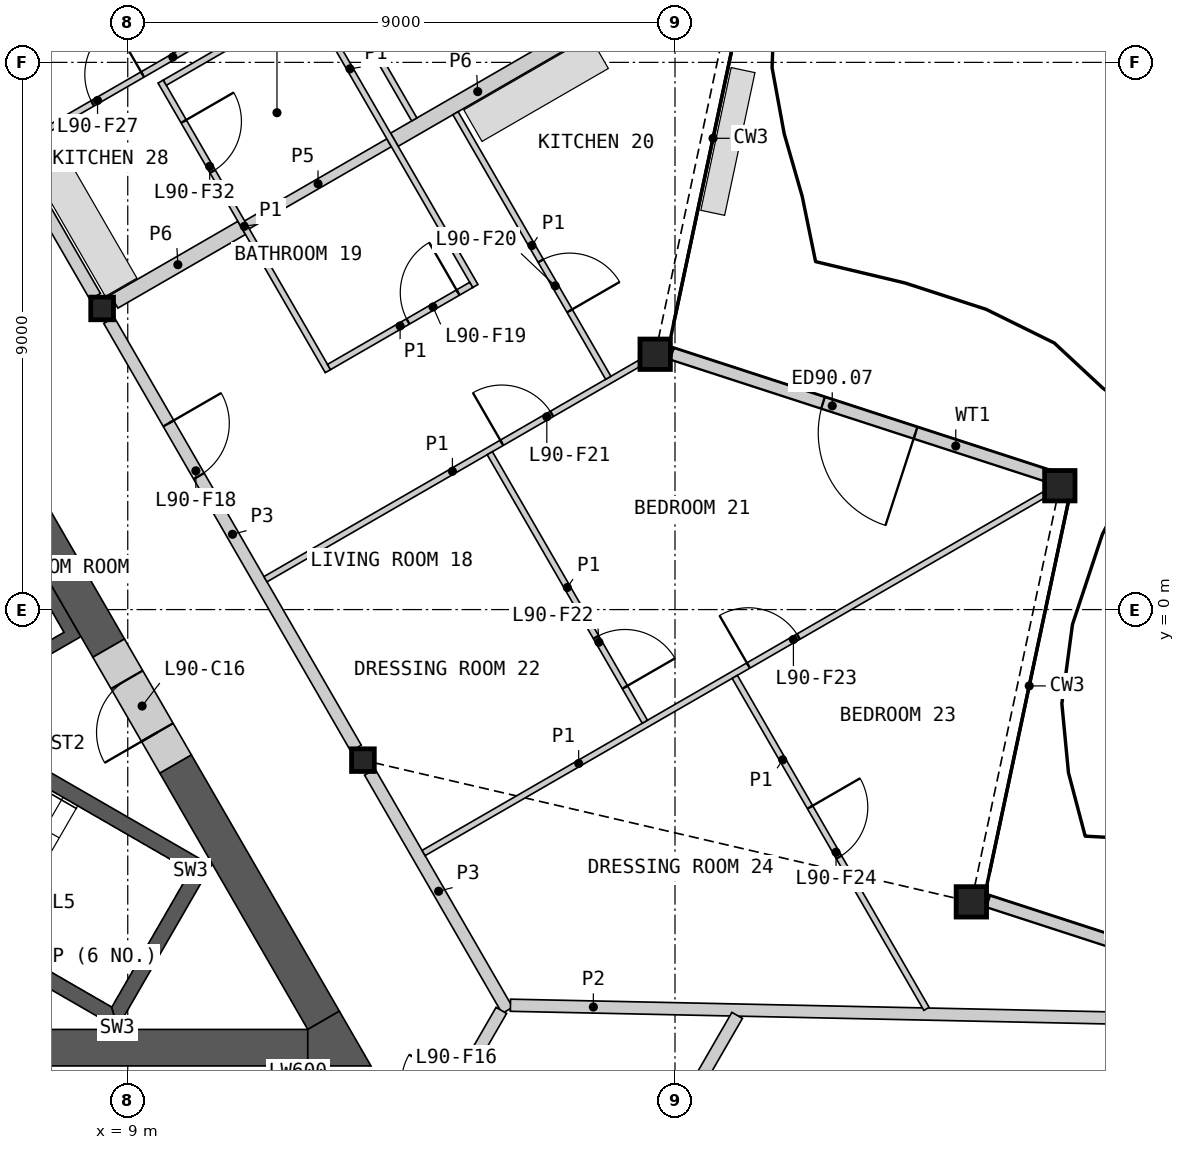
"""IFC4 building model, lengths in metres.
Left out: names, types, materials, properties, quantities, classifications, styles, units other than length and angle.
Written with IfcOpenShell. Run it as: python <this file> out.ifc"""

import sys

from ifc_helpers import new_model, si_unit, direction, frame, frame_2d, origin, origin_2d, place, context, subcontext, project, spatial, polyline, rectangle, hollow_rectangle, i_section, outline, extrude, element, fill, save


model = new_model("IFC4")
c1 = context("Model", 3, precision=1e-05, world=origin(), true_north=direction((0.0, 1.0)))
c2 = subcontext(c1, "Body", "Model", "MODEL_VIEW")
j1 = project(units=[si_unit("LENGTHUNIT", "METRE"), si_unit("PLANEANGLEUNIT", "RADIAN")], contexts=[c1])
p1 = place(None, origin())
s1 = spatial("IfcSite", under=j1, at=p1, CompositionType="ELEMENT")
p2 = place(p1, origin())
s2 = spatial("IfcBuilding", under=s1, at=p2, CompositionType="ELEMENT")
p3 = place(p2, frame((0.0, 0.0, 395.0)))
s3 = spatial("IfcBuildingStorey", under=s2, at=p3, CompositionType="ELEMENT", Elevation=395.0)
for number, where, z_axis, x_axis in (
    (1, (22.874, -4.807, 0.0), (0.0, 0.0, 1.0), (1.0, 0.0, 0.0)),
    (2, (24.329, 2.037, 0.0), (0.0, 0.0, 1.0), (1.0, 0.0, 0.0)),
    (3, (17.674, 4.199, 0.0), (0.0, 0.0, 1.0), (1.0, 0.0, 0.0)),
):
    element("IfcColumn", number, at=place(p3, frame(where, z_axis=z_axis, x_axis=x_axis)), inside=s3, PredefinedType="COLUMN", context=c2, shape_type="SweptSolid", body=[
        extrude(hollow_rectangle(XDim=0.5, YDim=0.5, WallThickness=0.03, at=origin_2d()), origin(), (0.0, 0.0, 1.0), 3.4),
    ])
for number, where, z_axis, x_axis in (
    (4, (12.868, -2.476, 0.0), (0.0, 0.0, 1.0), (1.0, 0.0, 0.0)),
    (5, (8.578, 4.953, 0.0), (0.0, 0.0, 1.0), (1.0, 0.0, 0.0)),
):
    element("IfcColumn", number, at=place(p3, frame(where, z_axis=z_axis, x_axis=x_axis)), inside=s3, PredefinedType="COLUMN", context=c2, shape_type="SweptSolid", body=[
        extrude(i_section(OverallWidth=0.374, OverallDepth=0.372, WebThickness=0.016, FlangeThickness=0.026, at=origin_2d()), origin(), (0.0, 0.0, 1.0), 3.4),
    ])
p4 = place(p3, frame((29.374, -6.822, 0.0), z_axis=(0.0, 0.0, 1.0), x_axis=(-0.951061473407, 0.309001737536, 0.0)))
e6 = element("IfcWall", 6, at=p4, inside=s3, PredefinedType="SOLIDWALL", context=c2, shape_type="SweptSolid", body=[
    extrude(rectangle(XDim=6.546, YDim=0.2, at=frame_2d((3.273, 0.0))), origin(), (0.0, 0.0, 1.0), 2.634),
])
p5 = place(p4, frame((2.333, 0.0, 0.0)))
e7 = element("IfcOpeningElement", 7, at=p5, cuts=e6, PredefinedType="OPENING", context=c2, shape_type="SweptSolid", body=[
    extrude(rectangle(XDim=1.6, YDim=2.25, at=frame_2d((0.8, 1.125))), frame((0.0, 0.11, 0.0), z_axis=(0.0, -1.0, 0.0), x_axis=(1.0, 0.0, 0.0)), (0.0, 0.0, 1.0), 0.22),
])
p6 = place(p3, frame((24.174, 2.185, 0.0), z_axis=(0.0, 0.0, 1.0), x_axis=(-0.951061473407, 0.309001737536, 0.0)))
e8 = element("IfcWall", 8, at=p6, inside=s3, PredefinedType="SOLIDWALL", context=c2, shape_type="SweptSolid", body=[
    extrude(rectangle(XDim=6.546, YDim=0.2, at=frame_2d((3.273, 0.0))), origin(), (0.0, 0.0, 1.0), 2.634),
])
p7 = place(p6, frame((2.333, 0.0, 0.0)))
e9 = element("IfcOpeningElement", 9, at=p7, cuts=e8, PredefinedType="OPENING", context=c2, shape_type="SweptSolid", body=[
    extrude(rectangle(XDim=1.6, YDim=2.25, at=frame_2d((0.8, 1.125))), frame((0.0, 0.11, 0.0), z_axis=(0.0, -1.0, 0.0), x_axis=(1.0, 0.0, 0.0)), (0.0, 0.0, 1.0), 0.22),
])
p8 = place(p3, origin())
e10 = element("IfcWall", 10, at=p8, inside=s3, PredefinedType="SHEAR", context=c2, shape_type="SweptSolid", body=[
    extrude(outline(polyline([(1.561, 6.097), (3.731, 7.35), (8.231, -0.444), (6.061, -1.697), (5.96, -1.524), (7.952, -0.374), (6.952, 1.358), (4.96, 0.208), (4.861, 0.381), (6.852, 1.531), (5.852, 3.263), (3.861, 2.113), (3.76, 2.287), (5.752, 3.437), (4.752, 5.169), (2.76, 4.019), (2.66, 4.192), (4.652, 5.342), (3.652, 7.074), (1.66, 5.924), (1.561, 6.097)])), origin(), (0.0, 0.0, 1.0), 3.1),
])
p9 = place(p3, origin())
e11 = element("IfcWall", 11, at=p9, inside=s3, PredefinedType="SHEAR", context=c2, shape_type="SweptSolid", body=[
    extrude(outline(polyline([(3.763, -3.956), (8.83, -6.881), (8.738, -6.539), (3.888, -3.739), (3.763, -3.956)])), origin(), (0.0, 0.0, 1.0), 3.1),
])
p10 = place(p3, origin())
e12 = element("IfcWall", 12, at=p10, inside=s3, PredefinedType="SHEAR", context=c2, shape_type="SweptSolid", body=[
    extrude(outline(polyline([(8.83, -6.881), (10.374, -4.206), (10.032, -4.298), (8.738, -6.539), (8.83, -6.881)])), origin(), (0.0, 0.0, 1.0), 3.1),
])
p11 = place(p3, origin())
e13 = element("IfcWall", 13, at=p11, inside=s3, PredefinedType="SHEAR", context=c2, shape_type="SweptSolid", body=[
    extrude(outline(polyline([(10.032, -4.298), (10.374, -4.206), (5.307, -1.281), (5.182, -1.498), (10.032, -4.298)])), origin(), (0.0, 0.0, 1.0), 3.1),
])
p12 = place(p3, frame((-11.961, -7.206, 0.0), z_axis=(0.0, 0.0, 1.0), x_axis=(1.0, 0.0, 0.0)))
e14 = element("IfcWall", 14, at=p12, inside=s3, PredefinedType="SHEAR", context=c2, shape_type="SweptSolid", body=[
    extrude(rectangle(XDim=23.921, YDim=0.6, at=frame_2d((11.961, 0.0))), origin(), (0.0, 0.0, 1.0), 3.1),
])
p13 = place(p3, frame((8.686, -0.634, 0.0), z_axis=(0.0, 0.0, 1.0), x_axis=(-0.50001836461, 0.866014800712, 0.0)))
e15 = element("IfcWall", 15, at=p13, inside=s3, PredefinedType="SHEAR", context=c2, shape_type="SweptSolid", body=[
    extrude(rectangle(XDim=10.451, YDim=0.6, at=frame_2d((5.225, 0.0))), origin(), (0.0, 0.0, 1.0), 3.1),
])
p14 = place(p3, frame((12.221, -6.756, 0.0), z_axis=(0.0, 0.0, 1.0), x_axis=(-0.50000604952, 0.866021911064, 0.0)))
e16 = element("IfcWall", 16, at=p14, inside=s3, PredefinedType="SHEAR", context=c2, shape_type="SweptSolid", body=[
    extrude(rectangle(XDim=4.869, YDim=0.6, at=frame_2d((2.434, 0.0))), origin(), (0.0, 0.0, 1.0), 3.1),
])
p15 = place(p3, origin())
e17 = element("IfcWall", 17, at=p15, inside=s3, PredefinedType="SHEAR", context=c2, shape_type="SweptSolid", body=[
    extrude(outline(polyline([(11.961, -7.506), (11.961, -6.906), (12.48, -6.606), (13.0, -7.506), (11.961, -7.506)])), origin(), (0.0, 0.0, 1.0), 3.1),
])
p16 = place(p3, frame((9.786, -2.539, 0.0), z_axis=(0.0, 0.0, 1.0), x_axis=(-0.499981787252, 0.866035918664, 0.0)))
e18 = element("IfcWall", 18, at=p16, inside=s3, PredefinedType="SHEAR", context=c2, shape_type="SweptSolid", body=[
    extrude(rectangle(XDim=2.2, YDim=0.6, at=frame_2d((1.1, 0.0))), origin(), (0.0, 0.0, 1.0), 3.1),
])
p17 = place(p16, frame((0.6, 0.0, 0.0)))
e19 = element("IfcOpeningElement", 19, at=p17, cuts=e18, PredefinedType="OPENING", context=c2, shape_type="SweptSolid", body=[
    extrude(rectangle(XDim=1.0, YDim=2.1, at=frame_2d((0.5, 1.05))), frame((0.0, 0.31, 0.0), z_axis=(0.0, -1.0, 0.0), x_axis=(1.0, 0.0, 0.0)), (0.0, 0.0, 1.0), 0.62),
])
p18 = place(p3, frame((4.403, 12.185, 0.0), z_axis=(0.0, 0.0, 1.0), x_axis=(0.499992155518, -0.866029932751, 0.0)))
e20 = element("IfcWall", 20, at=p18, inside=s3, PredefinedType="PARTITIONING", context=c2, shape_type="SweptSolid", body=[
    extrude(rectangle(XDim=8.123, YDim=0.2, at=frame_2d((4.062, 0.0))), origin(), (0.0, 0.0, 1.0), 3.1),
])
p19 = place(p18, frame((3.762, 0.0, 0.0)))
e21 = element("IfcOpeningElement", 21, at=p19, cuts=e20, PredefinedType="OPENING", context=c2, shape_type="SweptSolid", body=[
    extrude(rectangle(XDim=1.0, YDim=2.1, at=frame_2d((0.5, 1.05))), frame((0.0, 0.11, 0.0), z_axis=(0.0, -1.0, 0.0), x_axis=(1.0, 0.0, 0.0)), (0.0, 0.0, 1.0), 0.22),
])
p20 = place(p3, frame((8.692, 4.756, 0.0), z_axis=(0.0, 0.0, 1.0), x_axis=(0.500001682468, -0.866024432409, 0.0)))
e22 = element("IfcWall", 22, at=p20, inside=s3, PredefinedType="PARTITIONING", context=c2, shape_type="SweptSolid", body=[
    extrude(rectangle(XDim=8.124, YDim=0.2, at=frame_2d((4.062, 0.0))), origin(), (0.0, 0.0, 1.0), 3.1),
])
p21 = place(p20, frame((1.956, 0.0, 0.0)))
e23 = element("IfcOpeningElement", 23, at=p21, cuts=e22, PredefinedType="OPENING", context=c2, shape_type="SweptSolid", body=[
    extrude(rectangle(XDim=1.0, YDim=2.1, at=frame_2d((0.5, 1.05))), frame((0.0, 0.11, 0.0), z_axis=(0.0, -1.0, 0.0), x_axis=(1.0, 0.0, 0.0)), (0.0, 0.0, 1.0), 0.22),
])
p22 = place(p3, frame((13.385, 7.728, 0.0), z_axis=(0.0, 0.0, 1.0), x_axis=(0.866023139795, 0.500003921324, 0.0)))
e24 = element("IfcWall", 24, at=p22, inside=s3, PredefinedType="PARTITIONING", context=c2, shape_type="SweptSolid", body=[
    extrude(rectangle(XDim=6.332, YDim=0.25, at=frame_2d((3.166, 0.0))), origin(), (0.0, 0.0, 1.0), 2.33),
])
p23 = place(p3, frame((12.981, -2.673, 0.0), z_axis=(0.0, 0.0, 1.0), x_axis=(0.499974648164, -0.866040040179, 0.0)))
e25 = element("IfcWall", 25, at=p23, inside=s3, PredefinedType="PARTITIONING", context=c2, shape_type="SweptSolid", body=[
    extrude(rectangle(XDim=4.525, YDim=0.2, at=frame_2d((2.263, 0.0))), origin(), (0.0, 0.0, 1.0), 3.1),
])
p24 = place(p3, frame((13.281, -9.819, 0.0), z_axis=(0.0, 0.0, 1.0), x_axis=(0.499958791762, 0.866049194065, 0.0)))
e26 = element("IfcWall", 26, at=p24, inside=s3, PredefinedType="PARTITIONING", context=c2, shape_type="SweptSolid", body=[
    extrude(rectangle(XDim=3.726, YDim=0.2, at=frame_2d((1.863, 0.0))), origin(), (0.0, 0.0, 1.0), 3.1),
])
p25 = place(p24, frame((1.388, 0.0, 0.0)))
e27 = element("IfcOpeningElement", 27, at=p25, cuts=e26, PredefinedType="OPENING", context=c2, shape_type="SweptSolid", body=[
    extrude(rectangle(XDim=0.95, YDim=2.1, at=frame_2d((0.475, 1.05))), frame((0.0, 0.11, 0.0), z_axis=(0.0, -1.0, 0.0), x_axis=(1.0, 0.0, 0.0)), (0.0, 0.0, 1.0), 0.22),
])
p26 = place(p3, frame((8.775, 5.066, 0.0), z_axis=(0.0, 0.0, 1.0), x_axis=(0.865989219354, 0.500062668036, 0.0)))
e28 = element("IfcWall", 28, at=p26, inside=s3, PredefinedType="PARTITIONING", context=c2, shape_type="SweptSolid", body=[
    extrude(rectangle(XDim=2.423, YDim=0.25, at=frame_2d((1.211, 0.0))), origin(), (0.0, 0.0, 1.0), 2.33),
])
p27 = place(p3, frame((15.294, -6.508, 0.0), z_axis=(0.0, 0.0, 1.0), x_axis=(0.999775726416, -0.02117774467, 0.0)))
e29 = element("IfcWall", 29, at=p27, inside=s3, PredefinedType="PARTITIONING", context=c2, shape_type="SweptSolid", body=[
    extrude(rectangle(XDim=13.638, YDim=0.2, at=frame_2d((6.819, 0.0))), origin(), (0.0, 0.0, 1.0), 2.33),
])
p28 = place(p3, frame((17.271, -9.708, 0.0), z_axis=(0.0, 0.0, 1.0), x_axis=(0.499983843005, 0.866034731829, 0.0)))
e30 = element("IfcWall", 30, at=p28, inside=s3, PredefinedType="PARTITIONING", context=c2, shape_type="SweptSolid", body=[
    extrude(rectangle(XDim=3.503, YDim=0.2, at=frame_2d((1.752, 0.0))), origin(), (0.0, 0.0, 1.0), 2.33),
])
p29 = place(p3, frame((10.96, 6.328, 0.0), z_axis=(0.0, 0.0, 1.0), x_axis=(0.866059108428, 0.4999416173, 0.0)))
e31 = element("IfcWall", 31, at=p29, inside=s3, PredefinedType="PLUMBINGWALL", context=c2, shape_type="SweptSolid", body=[
    extrude(rectangle(XDim=2.7, YDim=0.15, at=frame_2d((1.35, 0.0))), origin(), (0.0, 0.0, 1.0), 2.33),
])
p30 = place(p3, frame((13.865, -4.004, 0.0), z_axis=(0.0, 0.0, 1.0), x_axis=(0.866023404247, 0.500003463284, 0.0)))
e32 = element("IfcWall", 32, at=p30, inside=s3, PredefinedType="PARTITIONING", context=c2, shape_type="SweptSolid", body=[
    extrude(rectangle(XDim=11.782, YDim=0.1, at=frame_2d((5.891, 0.0))), origin(), (0.0, 0.0, 1.0), 2.33),
])
p31 = place(p30, frame((6.168, 0.0, 0.0)))
e33 = element("IfcOpeningElement", 33, at=p31, cuts=e32, PredefinedType="OPENING", context=c2, shape_type="SweptSolid", body=[
    extrude(rectangle(XDim=0.95, YDim=2.1, at=frame_2d((0.475, 1.05))), frame((0.0, 0.06, 0.0), z_axis=(0.0, -1.0, 0.0), x_axis=(1.0, 0.0, 0.0)), (0.0, 0.0, 1.0), 0.12),
])
p32 = place(p3, frame((11.265, 0.5, 0.0), z_axis=(0.0, 0.0, 1.0), x_axis=(0.866033839264, 0.499985389037, 0.0)))
e34 = element("IfcWall", 34, at=p32, inside=s3, PredefinedType="PARTITIONING", context=c2, shape_type="SweptSolid", body=[
    extrude(rectangle(XDim=7.1, YDim=0.1, at=frame_2d((3.55, 0.0))), origin(), (0.0, 0.0, 1.0), 2.33),
])
p33 = place(p32, frame((4.488, 0.0, 0.0)))
e35 = element("IfcOpeningElement", 35, at=p33, cuts=e34, PredefinedType="OPENING", context=c2, shape_type="SweptSolid", body=[
    extrude(rectangle(XDim=0.95, YDim=2.1, at=frame_2d((0.475, 1.05))), frame((0.0, 0.06, 0.0), z_axis=(0.0, -1.0, 0.0), x_axis=(1.0, 0.0, 0.0)), (0.0, 0.0, 1.0), 0.12),
])
p34 = place(p3, frame((18.983, -1.107, 0.0), z_axis=(0.0, 0.0, 1.0), x_axis=(0.500016298831, -0.866015993445, 0.0)))
e36 = element("IfcWall", 36, at=p34, inside=s3, PredefinedType="PARTITIONING", context=c2, shape_type="SweptSolid", body=[
    extrude(rectangle(XDim=6.305, YDim=0.1, at=frame_2d((3.152, 0.0))), origin(), (0.0, 0.0, 1.0), 2.33),
])
p35 = place(p34, frame((2.475, 0.0, 0.0)))
e37 = element("IfcOpeningElement", 37, at=p35, cuts=e36, PredefinedType="OPENING", context=c2, shape_type="SweptSolid", body=[
    extrude(rectangle(XDim=0.95, YDim=2.1, at=frame_2d((0.475, 1.05))), frame((0.0, 0.06, 0.0), z_axis=(0.0, -1.0, 0.0), x_axis=(1.0, 0.0, 0.0)), (0.0, 0.0, 1.0), 0.12),
])
p36 = place(p3, frame((7.165, 7.601, 0.0), z_axis=(0.0, 0.0, 1.0), x_axis=(0.866017493347, 0.500013701029, 0.0)))
e38 = element("IfcWall", 38, at=p36, inside=s3, PredefinedType="PARTITIONING", context=c2, shape_type="SweptSolid", body=[
    extrude(rectangle(XDim=5.95, YDim=0.1, at=frame_2d((2.975, 0.0))), origin(), (0.0, 0.0, 1.0), 2.33),
])
p37 = place(p36, frame((1.45, 0.0, 0.0)))
e39 = element("IfcOpeningElement", 39, at=p37, cuts=e38, PredefinedType="OPENING", context=c2, shape_type="SweptSolid", body=[
    extrude(rectangle(XDim=0.95, YDim=2.1, at=frame_2d((0.475, 1.05))), frame((0.0, 0.06, 0.0), z_axis=(0.0, -1.0, 0.0), x_axis=(1.0, 0.0, 0.0)), (0.0, 0.0, 1.0), 0.12),
])
p38 = place(p3, frame((11.967, 10.084, 0.0), z_axis=(0.0, 0.0, 1.0), x_axis=(0.500015767406, -0.866016300277, 0.0)))
e40 = element("IfcWall", 40, at=p38, inside=s3, PredefinedType="PARTITIONING", context=c2, shape_type="SweptSolid", body=[
    extrude(rectangle(XDim=5.5, YDim=0.1, at=frame_2d((2.75, 0.0))), origin(), (0.0, 0.0, 1.0), 2.33),
])
p39 = place(p3, frame((9.542, 8.684, 0.0), z_axis=(0.0, 0.0, 1.0), x_axis=(0.499996545922, -0.866027397988, 0.0)))
e41 = element("IfcWall", 41, at=p39, inside=s3, PredefinedType="PARTITIONING", context=c2, shape_type="SweptSolid", body=[
    extrude(rectangle(XDim=5.5, YDim=0.1, at=frame_2d((2.75, 0.0))), origin(), (0.0, 0.0, 1.0), 2.33),
])
p40 = place(p39, frame((0.756, 0.0, 0.0)))
e42 = element("IfcOpeningElement", 42, at=p40, cuts=e41, PredefinedType="OPENING", context=c2, shape_type="SweptSolid", body=[
    extrude(rectangle(XDim=0.95, YDim=2.1, at=frame_2d((0.475, 1.05))), frame((0.0, 0.06, 0.0), z_axis=(0.0, -1.0, 0.0), x_axis=(1.0, 0.0, 0.0)), (0.0, 0.0, 1.0), 0.12),
])
p41 = place(p3, frame((14.39, 8.164, 0.0), z_axis=(0.0, 0.0, 1.0), x_axis=(0.499990214365, -0.86603105345, 0.0)))
e43 = element("IfcWall", 43, at=p41, inside=s3, PredefinedType="PARTITIONING", context=c2, shape_type="SweptSolid", body=[
    extrude(rectangle(XDim=5.025, YDim=0.1, at=frame_2d((2.512, 0.0))), origin(), (0.0, 0.0, 1.0), 2.33),
])
p42 = place(p41, frame((2.803, 0.0, 0.0)))
e44 = element("IfcOpeningElement", 44, at=p42, cuts=e43, PredefinedType="OPENING", context=c2, shape_type="SweptSolid", body=[
    extrude(rectangle(XDim=0.95, YDim=2.1, at=frame_2d((0.475, 1.05))), frame((0.0, 0.06, 0.0), z_axis=(0.0, -1.0, 0.0), x_axis=(1.0, 0.0, 0.0)), (0.0, 0.0, 1.0), 0.12),
])
p43 = place(p3, frame((14.954, 2.572, 0.0), z_axis=(0.0, 0.0, 1.0), x_axis=(0.499984882974, -0.866034131428, 0.0)))
e45 = element("IfcWall", 45, at=p43, inside=s3, PredefinedType="PARTITIONING", context=c2, shape_type="SweptSolid", body=[
    extrude(rectangle(XDim=5.1, YDim=0.1, at=frame_2d((2.55, 0.0))), origin(), (0.0, 0.0, 1.0), 2.33),
])
p44 = place(p43, frame((3.494, 0.0, 0.0)))
e46 = element("IfcOpeningElement", 46, at=p44, cuts=e45, PredefinedType="OPENING", context=c2, shape_type="SweptSolid", body=[
    extrude(rectangle(XDim=0.95, YDim=2.1, at=frame_2d((0.475, 1.05))), frame((0.0, 0.06, 0.0), z_axis=(0.0, -1.0, 0.0), x_axis=(1.0, 0.0, 0.0)), (0.0, 0.0, 1.0), 0.12),
])
p45 = place(p3, frame((12.3, 10.508, 0.0), z_axis=(0.0, 0.0, 1.0), x_axis=(0.500024172624, -0.866011447264, 0.0)))
e47 = element("IfcWall", 47, at=p45, inside=s3, PredefinedType="PARTITIONING", context=c2, shape_type="SweptSolid", body=[
    extrude(rectangle(XDim=2.825, YDim=0.1, at=frame_2d((1.413, 0.0))), origin(), (0.0, 0.0, 1.0), 2.33),
])
p46 = place(p3, frame((9.61, 8.666, 0.0), z_axis=(0.0, 0.0, 1.0), x_axis=(0.86599734893, 0.500048589285, 0.0)))
e48 = element("IfcWall", 48, at=p46, inside=s3, PredefinedType="PARTITIONING", context=c2, shape_type="SweptSolid", body=[
    extrude(rectangle(XDim=2.7, YDim=0.1, at=frame_2d((1.35, 0.0))), origin(), (0.0, 0.0, 1.0), 2.33),
])
p47 = place(p3, frame((12.31, 3.99, 0.0), z_axis=(0.0, 0.0, 1.0), x_axis=(0.86599734893, 0.500048589285, 0.0)))
e49 = element("IfcWall", 49, at=p47, inside=s3, PredefinedType="PARTITIONING", context=c2, shape_type="SweptSolid", body=[
    extrude(rectangle(XDim=2.7, YDim=0.1, at=frame_2d((1.35, 0.0))), origin(), (0.0, 0.0, 1.0), 2.33),
])
p48 = place(p47, frame((1.5, 0.0, 0.0)))
e50 = element("IfcOpeningElement", 50, at=p48, cuts=e49, PredefinedType="OPENING", context=c2, shape_type="SweptSolid", body=[
    extrude(rectangle(XDim=0.95, YDim=2.1, at=frame_2d((0.475, 1.05))), frame((0.0, 0.06, 0.0), z_axis=(0.0, -1.0, 0.0), x_axis=(1.0, 0.0, 0.0)), (0.0, 0.0, 1.0), 0.12),
])
p49 = place(p7, origin())
e51 = element("IfcDoor", 51, at=p49, inside=s3, OperationType="DOUBLE_DOOR_SINGLE_SWING", PredefinedType="DOOR", context=c2, shape_type="SweptSolid", body=[
    extrude(rectangle(XDim=1.6, YDim=2.25, at=frame_2d((0.8, 1.125))), frame((0.0, 0.025, 0.0), z_axis=(0.0, -1.0, 0.0), x_axis=(1.0, 0.0, 0.0)), (0.0, 0.0, 1.0), 0.05),
])
fill(e9, e51)
p50 = place(p17, origin())
e52 = element("IfcDoor", 52, at=p50, inside=s3, OperationType="SINGLE_SWING_LEFT", PredefinedType="DOOR", context=c2, shape_type="SweptSolid", body=[
    extrude(rectangle(XDim=1.0, YDim=2.1, at=frame_2d((0.5, 1.05))), frame((0.0, 0.055, 0.0), z_axis=(0.0, -1.0, 0.0), x_axis=(1.0, 0.0, 0.0)), (0.0, 0.0, 1.0), 0.05),
])
fill(e19, e52)
p51 = place(p21, origin())
e53 = element("IfcDoor", 53, at=p51, inside=s3, OperationType="SINGLE_SWING_LEFT", PredefinedType="DOOR", context=c2, shape_type="SweptSolid", body=[
    extrude(rectangle(XDim=1.0, YDim=2.1, at=frame_2d((0.5, 1.05))), frame((0.0, 0.025, 0.0), z_axis=(0.0, -1.0, 0.0), x_axis=(1.0, 0.0, 0.0)), (0.0, 0.0, 1.0), 0.05),
])
fill(e23, e53)
p52 = place(p48, origin())
e54 = element("IfcDoor", 54, at=p52, inside=s3, OperationType="SINGLE_SWING_RIGHT", PredefinedType="DOOR", context=c2, shape_type="SweptSolid", body=[
    extrude(rectangle(XDim=0.95, YDim=2.1, at=frame_2d((0.475, 1.05))), frame((0.0, 0.025, 0.0), z_axis=(0.0, -1.0, 0.0), x_axis=(1.0, 0.0, 0.0)), (0.0, 0.0, 1.0), 0.05),
])
fill(e50, e54)
p53 = place(p42, origin())
e55 = element("IfcDoor", 55, at=p53, inside=s3, OperationType="SINGLE_SWING_RIGHT", PredefinedType="DOOR", context=c2, shape_type="SweptSolid", body=[
    extrude(rectangle(XDim=0.95, YDim=2.1, at=frame_2d((0.475, 1.05))), frame((0.0, 0.025, 0.0), z_axis=(0.0, -1.0, 0.0), x_axis=(1.0, 0.0, 0.0)), (0.0, 0.0, 1.0), 0.05),
])
fill(e44, e55)
p54 = place(p33, origin())
e56 = element("IfcDoor", 56, at=p54, inside=s3, OperationType="SINGLE_SWING_LEFT", PredefinedType="DOOR", context=c2, shape_type="SweptSolid", body=[
    extrude(rectangle(XDim=0.95, YDim=2.1, at=frame_2d((0.475, 1.05))), frame((0.0, 0.025, 0.0), z_axis=(0.0, -1.0, 0.0), x_axis=(1.0, 0.0, 0.0)), (0.0, 0.0, 1.0), 0.05),
])
fill(e35, e56)
p55 = place(p44, origin())
e57 = element("IfcDoor", 57, at=p55, inside=s3, OperationType="SINGLE_SWING_RIGHT", PredefinedType="DOOR", context=c2, shape_type="SweptSolid", body=[
    extrude(rectangle(XDim=0.95, YDim=2.1, at=frame_2d((0.475, 1.05))), frame((0.0, 0.025, 0.0), z_axis=(0.0, -1.0, 0.0), x_axis=(1.0, 0.0, 0.0)), (0.0, 0.0, 1.0), 0.05),
])
fill(e46, e57)
p56 = place(p31, origin())
e58 = element("IfcDoor", 58, at=p56, inside=s3, OperationType="SINGLE_SWING_LEFT", PredefinedType="DOOR", context=c2, shape_type="SweptSolid", body=[
    extrude(rectangle(XDim=0.95, YDim=2.1, at=frame_2d((0.475, 1.05))), frame((0.0, 0.025, 0.0), z_axis=(0.0, -1.0, 0.0), x_axis=(1.0, 0.0, 0.0)), (0.0, 0.0, 1.0), 0.05),
])
fill(e33, e58)
p57 = place(p35, origin())
e59 = element("IfcDoor", 59, at=p57, inside=s3, OperationType="SINGLE_SWING_LEFT", PredefinedType="DOOR", context=c2, shape_type="SweptSolid", body=[
    extrude(rectangle(XDim=0.95, YDim=2.1, at=frame_2d((0.475, 1.05))), frame((0.0, 0.025, 0.0), z_axis=(0.0, -1.0, 0.0), x_axis=(1.0, 0.0, 0.0)), (0.0, 0.0, 1.0), 0.05),
])
fill(e37, e59)
p58 = place(p37, origin())
e60 = element("IfcDoor", 60, at=p58, inside=s3, OperationType="SINGLE_SWING_RIGHT", PredefinedType="DOOR", context=c2, shape_type="SweptSolid", body=[
    extrude(rectangle(XDim=0.95, YDim=2.1, at=frame_2d((0.475, 1.05))), frame((0.0, 0.025, 0.0), z_axis=(0.0, -1.0, 0.0), x_axis=(1.0, 0.0, 0.0)), (0.0, 0.0, 1.0), 0.05),
])
fill(e39, e60)
p59 = place(p40, origin())
e61 = element("IfcDoor", 61, at=p59, inside=s3, OperationType="SINGLE_SWING_LEFT", PredefinedType="DOOR", context=c2, shape_type="SweptSolid", body=[
    extrude(rectangle(XDim=0.95, YDim=2.1, at=frame_2d((0.475, 1.05))), frame((0.0, 0.025, 0.0), z_axis=(0.0, -1.0, 0.0), x_axis=(1.0, 0.0, 0.0)), (0.0, 0.0, 1.0), 0.05),
])
fill(e42, e61)
save(model, sys.argv[1])
